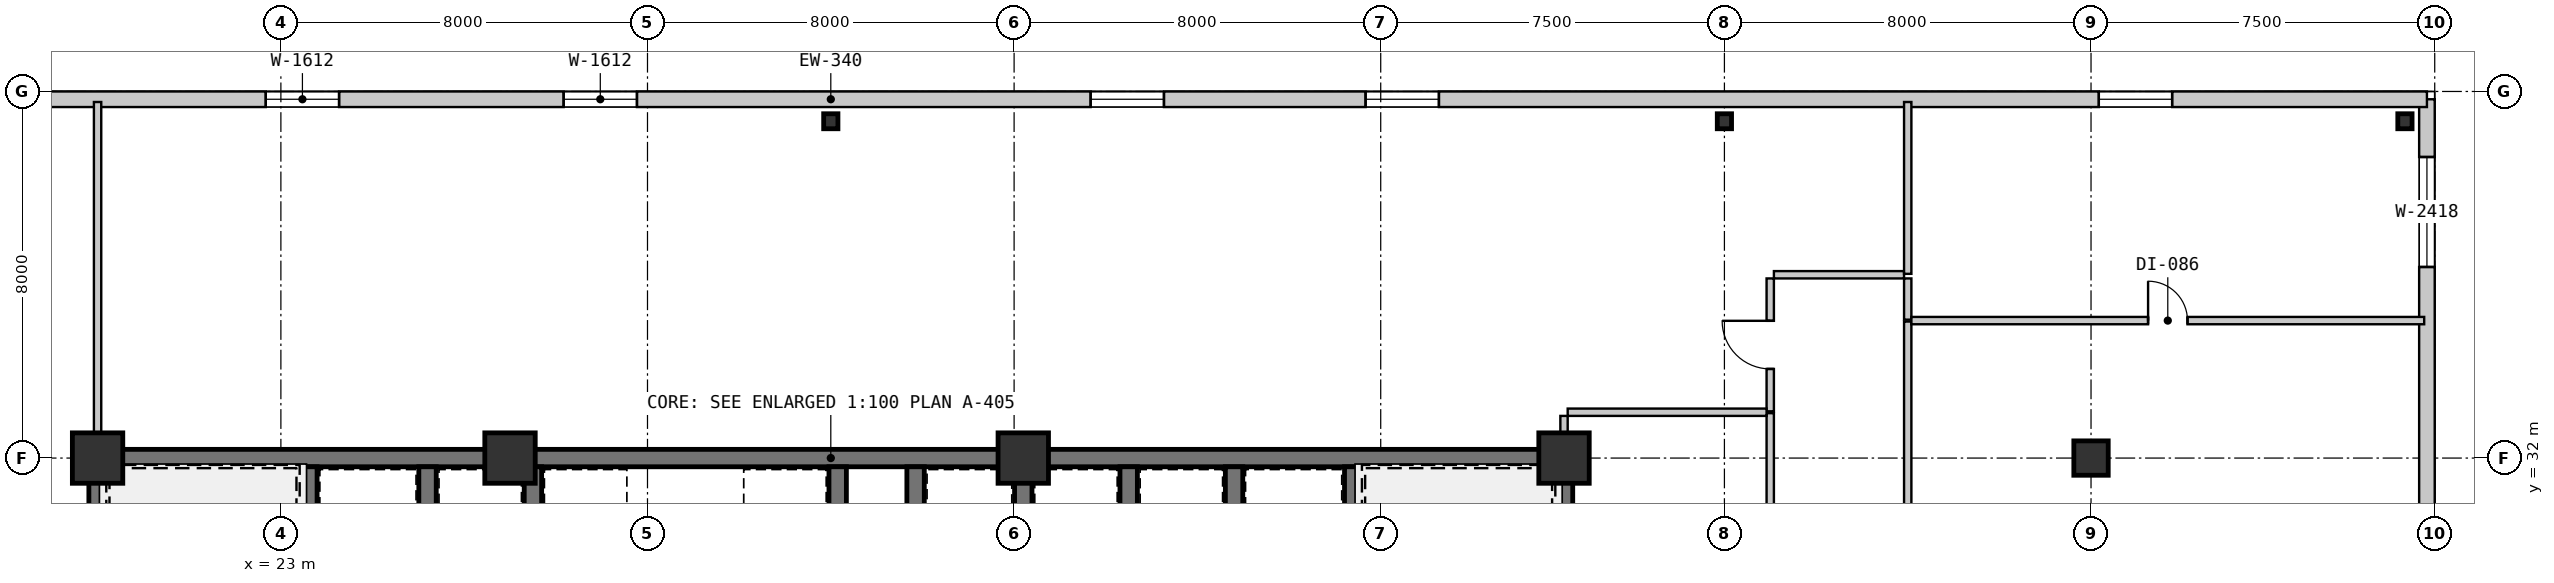
"""IFC4 building model, lengths in metres.
Left out: names, types, materials, properties, quantities, classifications, styles, units other than length and angle.
Written with IfcOpenShell. Run it as: python <this file> out.ifc"""

import sys

from ifc_helpers import new_model, si_unit, direction, frame, frame_2d, origin, origin_2d, place, context, subcontext, project, spatial, rectangle, circle, i_section, extrude, source, transform, mapped, element, fill, save


model = new_model("IFC4")
c1 = context("Model", 3, precision=1e-05, world=origin(), true_north=direction((0.0, 1.0)))
c2 = subcontext(c1, "Body", "Model", "MODEL_VIEW")
j1 = project(units=[si_unit("LENGTHUNIT", "METRE"), si_unit("PLANEANGLEUNIT", "RADIAN")], contexts=[c1])
p1 = place(None, origin())
s1 = spatial("IfcSite", under=j1, at=p1, CompositionType="ELEMENT")
p2 = place(p1, origin())
s2 = spatial("IfcBuilding", under=s1, at=p2, CompositionType="ELEMENT")
p3 = place(p2, frame((0.0, 0.0, 8.4)))
s3 = spatial("IfcBuildingStorey", under=s2, at=p3, CompositionType="ELEMENT", Elevation=8.4)
m1 = source(origin(), c2, "Body", "SweptSolid", [
    extrude(rectangle(XDim=1.1, YDim=1.1, at=origin_2d()), origin(), (0.0, 0.0, 1.0), 4.55),
])
for number, where, z_axis, x_axis in (
    (1, (19.0, 32.0, 0.0), (0.0, 0.0, 1.0), (1.0, 0.0, 0.0)),
    (2, (28.0, 32.0, 0.0), (0.0, 0.0, 1.0), (1.0, 0.0, 0.0)),
    (3, (39.2, 32.0, 0.0), (0.0, 0.0, 1.0), (1.0, 0.0, 0.0)),
    (4, (51.0, 32.0, 0.0), (0.0, 0.0, 1.0), (1.0, 0.0, 0.0)),
):
    element("IfcColumn", number, at=place(p3, frame(where, z_axis=z_axis, x_axis=x_axis)), inside=s3, PredefinedType="COLUMN", context=c2, shape_type="MappedRepresentation", body=[
        mapped(m1, transform((0.0, 0.0, 0.0), scale=1.0)),
    ])
m2 = source(origin(), c2, "Body", "SweptSolid", [
    extrude(circle(Radius=0.375, at=origin_2d()), origin(), (0.0, 0.0, 1.0), 4.55),
])
p4 = place(p3, frame((62.5, 32.0, 0.0), z_axis=(0.0, 0.0, 1.0), x_axis=(1.0, 0.0, 0.0)))
e5 = element("IfcColumn", 5, at=p4, inside=s3, PredefinedType="COLUMN", context=c2, shape_type="MappedRepresentation", body=[
    mapped(m2, transform((0.0, 0.0, 0.0), scale=1.0)),
])
m3 = source(origin(), c2, "Body", "SweptSolid", [
    extrude(i_section(OverallWidth=0.311, OverallDepth=0.327, WebThickness=0.016, FlangeThickness=0.025, at=origin_2d()), origin(), (0.0, 0.0, 1.0), 4.55),
])
for number, where, z_axis, x_axis in (
    (6, (69.35, 39.35, 0.0), (0.0, 0.0, 1.0), (1.0, 0.0, 0.0)),
    (7, (35.0, 39.35, 0.0), (0.0, 0.0, 1.0), (1.0, 0.0, 0.0)),
    (8, (54.5, 39.35, 0.0), (0.0, 0.0, 1.0), (1.0, 0.0, 0.0)),
):
    element("IfcColumn", number, at=place(p3, frame(where, z_axis=z_axis, x_axis=x_axis)), inside=s3, PredefinedType="COLUMN", context=c2, shape_type="MappedRepresentation", body=[
        mapped(m3, transform((0.0, 0.0, 0.0), scale=1.0)),
    ])
m4 = source(origin(), c2, "Body", "SweptSolid", [
    extrude(rectangle(XDim=39.66, YDim=0.34, at=frame_2d((19.83, 0.0))), origin(), (0.0, 0.0, 1.0), 4.29),
])
p5 = place(p3, frame((69.83, 0.17, 0.0), z_axis=(0.0, 0.0, 1.0), x_axis=(0.0, 1.0, 0.0)))
e9 = element("IfcWall", 9, at=p5, inside=s3, PredefinedType="SOLIDWALL", context=c2, shape_type="MappedRepresentation", body=[
    mapped(m4, transform((0.0, 0.0, 0.0), scale=1.0)),
])
m5 = source(origin(), c2, "Body", "SweptSolid", [
    extrude(rectangle(XDim=1.8, YDim=1.6, at=frame_2d((0.9, 0.8))), frame((0.0, 0.18, 0.0), z_axis=(0.0, -1.0, 0.0), x_axis=(1.0, 0.0, 0.0)), (0.0, 0.0, 1.0), 0.36),
])
p6 = place(p5, frame((3.2, 0.0, 0.95)))
e10 = element("IfcOpeningElement", 10, at=p6, cuts=e9, PredefinedType="OPENING", context=c2, shape_type="MappedRepresentation", body=[
    mapped(m5, transform((0.0, 0.0, 0.0), scale=1.0)),
])
m6 = source(origin(), c2, "Body", "SweptSolid", [
    extrude(rectangle(XDim=1.5, YDim=1.5, at=frame_2d((0.75, 0.75))), frame((0.0, 0.18, 0.0), z_axis=(0.0, -1.0, 0.0), x_axis=(1.0, 0.0, 0.0)), (0.0, 0.0, 1.0), 0.36),
])
p7 = place(p5, frame((7.8, 0.0, 0.95)))
e11 = element("IfcOpeningElement", 11, at=p7, cuts=e9, PredefinedType="OPENING", context=c2, shape_type="MappedRepresentation", body=[
    mapped(m6, transform((0.0, 0.0, 0.0), scale=1.0)),
])
m7 = source(origin(), c2, "Body", "SweptSolid", [
    extrude(rectangle(XDim=1.2, YDim=1.5, at=frame_2d((0.6, 0.75))), frame((0.0, 0.18, 0.0), z_axis=(0.0, -1.0, 0.0), x_axis=(1.0, 0.0, 0.0)), (0.0, 0.0, 1.0), 0.36),
])
p8 = place(p5, frame((21.2, 0.0, 0.95)))
e12 = element("IfcOpeningElement", 12, at=p8, cuts=e9, PredefinedType="OPENING", context=c2, shape_type="MappedRepresentation", body=[
    mapped(m7, transform((0.0, 0.0, 0.0), scale=1.0)),
])
m8 = source(origin(), c2, "Body", "SweptSolid", [
    extrude(rectangle(XDim=2.4, YDim=1.8, at=frame_2d((1.2, 0.9))), frame((0.0, 0.18, 0.0), z_axis=(0.0, -1.0, 0.0), x_axis=(1.0, 0.0, 0.0)), (0.0, 0.0, 1.0), 0.36),
])
p9 = place(p5, frame((36.0, 0.0, 0.95)))
e13 = element("IfcOpeningElement", 13, at=p9, cuts=e9, PredefinedType="OPENING", context=c2, shape_type="MappedRepresentation", body=[
    mapped(m8, transform((0.0, 0.0, 0.0), scale=1.0)),
])
m9 = source(origin(), c2, "Body", "SweptSolid", [
    extrude(rectangle(XDim=69.66, YDim=0.34, at=frame_2d((34.83, 0.0))), origin(), (0.0, 0.0, 1.0), 4.29),
])
p10 = place(p3, frame((0.17, 39.83, 0.0), z_axis=(0.0, 0.0, 1.0), x_axis=(1.0, 0.0, 0.0)))
e14 = element("IfcWall", 14, at=p10, inside=s3, PredefinedType="SOLIDWALL", context=c2, shape_type="MappedRepresentation", body=[
    mapped(m9, transform((0.0, 0.0, 0.0), scale=1.0)),
])
m10 = source(origin(), c2, "Body", "SweptSolid", [
    extrude(rectangle(XDim=1.6, YDim=1.2, at=frame_2d((0.8, 0.6))), frame((0.0, 0.18, 0.0), z_axis=(0.0, -1.0, 0.0), x_axis=(1.0, 0.0, 0.0)), (0.0, 0.0, 1.0), 0.36),
])
p11 = place(p10, frame((4.5, 0.0, 0.95)))
e15 = element("IfcOpeningElement", 15, at=p11, cuts=e14, PredefinedType="OPENING", context=c2, shape_type="MappedRepresentation", body=[
    mapped(m10, transform((0.0, 0.0, 0.0), scale=1.0)),
])
p12 = place(p10, frame((22.5, 0.0, 0.95)))
e16 = element("IfcOpeningElement", 16, at=p12, cuts=e14, PredefinedType="OPENING", context=c2, shape_type="MappedRepresentation", body=[
    mapped(m10, transform((0.0, 0.0, 0.0), scale=1.0)),
])
p13 = place(p10, frame((29.0, 0.0, 0.95)))
e17 = element("IfcOpeningElement", 17, at=p13, cuts=e14, PredefinedType="OPENING", context=c2, shape_type="MappedRepresentation", body=[
    mapped(m10, transform((0.0, 0.0, 0.0), scale=1.0)),
])
p14 = place(p10, frame((40.5, 0.0, 0.95)))
e18 = element("IfcOpeningElement", 18, at=p14, cuts=e14, PredefinedType="OPENING", context=c2, shape_type="MappedRepresentation", body=[
    mapped(m10, transform((0.0, 0.0, 0.0), scale=1.0)),
])
p15 = place(p10, frame((46.5, 0.0, 0.95)))
e19 = element("IfcOpeningElement", 19, at=p15, cuts=e14, PredefinedType="OPENING", context=c2, shape_type="MappedRepresentation", body=[
    mapped(m10, transform((0.0, 0.0, 0.0), scale=1.0)),
])
p16 = place(p10, frame((62.5, 0.0, 0.95)))
e20 = element("IfcOpeningElement", 20, at=p16, cuts=e14, PredefinedType="OPENING", context=c2, shape_type="MappedRepresentation", body=[
    mapped(m10, transform((0.0, 0.0, 0.0), scale=1.0)),
])
m11 = source(origin(), c2, "Body", "SweptSolid", [
    extrude(rectangle(XDim=9.19, YDim=0.38, at=frame_2d((4.595, 0.0))), origin(), (0.0, 0.0, 1.0), 4.29),
])
p17 = place(p3, frame((18.81, 32.0, 0.0), z_axis=(0.0, 0.0, 1.0), x_axis=(1.0, 0.0, 0.0)))
e21 = element("IfcWall", 21, at=p17, inside=s3, PredefinedType="SHEAR", context=c2, shape_type="MappedRepresentation", body=[
    mapped(m11, transform((0.0, 0.0, 0.0), scale=1.0)),
])
m12 = source(origin(), c2, "Body", "SweptSolid", [
    extrude(rectangle(XDim=11.2, YDim=0.38, at=frame_2d((5.6, 0.0))), origin(), (0.0, 0.0, 1.0), 4.29),
])
p18 = place(p3, frame((28.0, 32.0, 0.0), z_axis=(0.0, 0.0, 1.0), x_axis=(1.0, 0.0, 0.0)))
e22 = element("IfcWall", 22, at=p18, inside=s3, PredefinedType="SHEAR", context=c2, shape_type="MappedRepresentation", body=[
    mapped(m12, transform((0.0, 0.0, 0.0), scale=1.0)),
])
m13 = source(origin(), c2, "Body", "SweptSolid", [
    extrude(rectangle(XDim=11.99, YDim=0.38, at=frame_2d((5.995, 0.0))), origin(), (0.0, 0.0, 1.0), 4.29),
])
p19 = place(p3, frame((39.2, 32.0, 0.0), z_axis=(0.0, 0.0, 1.0), x_axis=(1.0, 0.0, 0.0)))
e23 = element("IfcWall", 23, at=p19, inside=s3, PredefinedType="SHEAR", context=c2, shape_type="MappedRepresentation", body=[
    mapped(m13, transform((0.0, 0.0, 0.0), scale=1.0)),
])
m14 = source(origin(), c2, "Body", "SweptSolid", [
    extrude(rectangle(XDim=3.61, YDim=0.38, at=frame_2d((1.805, 0.0))), origin(), (0.0, 0.0, 1.0), 4.29),
])
for number, where, z_axis, x_axis in (
    (24, (19.0, 28.2, 0.0), (0.0, 0.0, 1.0), (0.0, 1.0, 0.0)),
    (25, (51.0, 28.2, 0.0), (0.0, 0.0, 1.0), (0.0, 1.0, 0.0)),
):
    element("IfcWall", number, at=place(p3, frame(where, z_axis=z_axis, x_axis=x_axis)), inside=s3, PredefinedType="SHEAR", context=c2, shape_type="MappedRepresentation", body=[
        mapped(m14, transform((0.0, 0.0, 0.0), scale=1.0)),
    ])
m15 = source(origin(), c2, "Body", "SweptSolid", [
    extrude(rectangle(XDim=3.42, YDim=0.38, at=frame_2d((1.71, 0.0))), origin(), (0.0, 0.0, 1.0), 4.29),
])
for number, where, z_axis, x_axis in (
    (26, (23.6, 28.39, 0.0), (0.0, 0.0, 1.0), (0.0, 1.0, 0.0)),
    (27, (26.2, 28.39, 0.0), (0.0, 0.0, 1.0), (0.0, 1.0, 0.0)),
    (28, (46.4, 31.81, 0.0), (0.0, 0.0, 1.0), (0.0, -1.0, 0.0)),
    (29, (43.8, 31.81, 0.0), (0.0, 0.0, 1.0), (0.0, -1.0, 0.0)),
):
    element("IfcWall", number, at=place(p3, frame(where, z_axis=z_axis, x_axis=x_axis)), inside=s3, PredefinedType="SHEAR", context=c2, shape_type="MappedRepresentation", body=[
        mapped(m15, transform((0.0, 0.0, 0.0), scale=1.0)),
    ])
m16 = source(origin(), c2, "Body", "SweptSolid", [
    extrude(rectangle(XDim=1.12, YDim=0.38, at=frame_2d((0.56, 0.0))), origin(), (0.0, 0.0, 1.0), 4.29),
])
for number, where, z_axis, x_axis in (
    (30, (35.15, 31.81, 0.0), (0.0, 0.0, 1.0), (0.0, -1.0, 0.0)),
    (31, (36.85, 30.69, 0.0), (0.0, 0.0, 1.0), (0.0, 1.0, 0.0)),
):
    element("IfcWall", number, at=place(p3, frame(where, z_axis=z_axis, x_axis=x_axis)), inside=s3, PredefinedType="SHEAR", context=c2, shape_type="MappedRepresentation", body=[
        mapped(m16, transform((0.0, 0.0, 0.0), scale=1.0)),
    ])
for number, where, z_axis, x_axis in (
    (32, (28.5, 28.39, 0.0), (0.0, 0.0, 1.0), (0.0, 1.0, 0.0)),
    (33, (39.2, 28.39, 0.0), (0.0, 0.0, 1.0), (0.0, 1.0, 0.0)),
    (34, (41.5, 28.39, 0.0), (0.0, 0.0, 1.0), (0.0, 1.0, 0.0)),
):
    element("IfcWall", number, at=place(p3, frame(where, z_axis=z_axis, x_axis=x_axis)), inside=s3, PredefinedType="SHEAR", context=c2, shape_type="MappedRepresentation", body=[
        mapped(m15, transform((0.0, 0.0, 0.0), scale=1.0)),
    ])
m17 = source(origin(), c2, "Body", "SweptSolid", [
    extrude(rectangle(XDim=9.959, YDim=0.16, at=frame_2d((4.98, 0.0))), origin(), (0.0, 0.0, 1.0), 4.29),
])
p20 = place(p3, frame((58.5, 34.98, 0.0), z_axis=(0.0, 0.0, 1.0), x_axis=(0.0, -1.0, 0.0)))
e35 = element("IfcWall", 35, at=p20, inside=s3, PredefinedType="PARTITIONING", context=c2, shape_type="MappedRepresentation", body=[
    mapped(m17, transform((0.0, 0.0, 0.0), scale=1.0)),
])
m18 = source(origin(), c2, "Body", "SweptSolid", [
    extrude(rectangle(XDim=1.05, YDim=2.1, at=frame_2d((0.525, 1.05))), frame((0.0, 0.09, 0.0), z_axis=(0.0, -1.0, 0.0), x_axis=(1.0, 0.0, 0.0)), (0.0, 0.0, 1.0), 0.18),
])
p21 = place(p20, frame((4.455, 0.0, 0.0)))
e36 = element("IfcOpeningElement", 36, at=p21, cuts=e35, PredefinedType="OPENING", context=c2, shape_type="MappedRepresentation", body=[
    mapped(m18, transform((0.0, 0.0, 0.0), scale=1.0)),
])
m19 = source(origin(), c2, "Body", "SweptSolid", [
    extrude(rectangle(XDim=0.9, YDim=0.16, at=frame_2d((0.45, 0.0))), origin(), (0.0, 0.0, 1.0), 4.29),
])
p22 = place(p3, frame((58.5, 35.92, 0.0), z_axis=(0.0, 0.0, 1.0), x_axis=(0.0, -1.0, 0.0)))
e37 = element("IfcWall", 37, at=p22, inside=s3, PredefinedType="PARTITIONING", context=c2, shape_type="MappedRepresentation", body=[
    mapped(m19, transform((0.0, 0.0, 0.0), scale=1.0)),
])
m20 = source(origin(), c2, "Body", "SweptSolid", [
    extrude(rectangle(XDim=8.9, YDim=0.16, at=frame_2d((4.45, 0.0))), origin(), (0.0, 0.0, 1.0), 4.29),
])
p23 = place(p3, frame((55.5, 24.08, 0.0), z_axis=(0.0, 0.0, 1.0), x_axis=(0.0, 1.0, 0.0)))
e38 = element("IfcWall", 38, at=p23, inside=s3, PredefinedType="PARTITIONING", context=c2, shape_type="MappedRepresentation", body=[
    mapped(m20, transform((0.0, 0.0, 0.0), scale=1.0)),
])
p24 = place(p23, frame((3.895, 0.0, 0.0)))
e39 = element("IfcOpeningElement", 39, at=p24, cuts=e38, PredefinedType="OPENING", context=c2, shape_type="MappedRepresentation", body=[
    mapped(m18, transform((0.0, 0.0, 0.0), scale=1.0)),
])
m21 = source(origin(), c2, "Body", "SweptSolid", [
    extrude(rectangle(XDim=2.9, YDim=0.16, at=frame_2d((1.45, 0.0))), origin(), (0.0, 0.0, 1.0), 4.29),
])
p25 = place(p3, frame((55.5, 33.02, 0.0), z_axis=(0.0, 0.0, 1.0), x_axis=(0.0, 1.0, 0.0)))
e40 = element("IfcWall", 40, at=p25, inside=s3, PredefinedType="PARTITIONING", context=c2, shape_type="MappedRepresentation", body=[
    mapped(m21, transform((0.0, 0.0, 0.0), scale=1.0)),
])
p26 = place(p25, frame((0.925, 0.0, 0.0)))
e41 = element("IfcOpeningElement", 41, at=p26, cuts=e40, PredefinedType="OPENING", context=c2, shape_type="MappedRepresentation", body=[
    mapped(m18, transform((0.0, 0.0, 0.0), scale=1.0)),
])
m22 = source(origin(), c2, "Body", "SweptSolid", [
    extrude(rectangle(XDim=2.84, YDim=0.16, at=frame_2d((1.42, 0.0))), origin(), (0.0, 0.0, 1.0), 4.29),
])
p27 = place(p3, frame((55.58, 36.0, 0.0), z_axis=(0.0, 0.0, 1.0), x_axis=(1.0, 0.0, 0.0)))
e42 = element("IfcWall", 42, at=p27, inside=s3, PredefinedType="PARTITIONING", context=c2, shape_type="MappedRepresentation", body=[
    mapped(m22, transform((0.0, 0.0, 0.0), scale=1.0)),
])
m23 = source(origin(), c2, "Body", "SweptSolid", [
    extrude(rectangle(XDim=7.58, YDim=0.16, at=frame_2d((3.79, 0.0))), origin(), (0.0, 0.0, 1.0), 4.29),
])
p28 = place(p3, frame((19.0, 39.77, 0.0), z_axis=(0.0, 0.0, 1.0), x_axis=(0.0, -1.0, 0.0)))
e43 = element("IfcWall", 43, at=p28, inside=s3, PredefinedType="PARTITIONING", context=c2, shape_type="MappedRepresentation", body=[
    mapped(m23, transform((0.0, 0.0, 0.0), scale=1.0)),
])
m24 = source(origin(), c2, "Body", "SweptSolid", [
    extrude(rectangle(XDim=11.19, YDim=0.16, at=frame_2d((5.595, 0.0))), origin(), (0.0, 0.0, 1.0), 4.29),
])
p29 = place(p3, frame((58.58, 35.0, 0.0), z_axis=(0.0, 0.0, 1.0), x_axis=(1.0, 0.0, 0.0)))
e44 = element("IfcWall", 44, at=p29, inside=s3, PredefinedType="PARTITIONING", context=c2, shape_type="MappedRepresentation", body=[
    mapped(m24, transform((0.0, 0.0, 0.0), scale=1.0)),
])
m25 = source(origin(), c2, "Body", "SweptSolid", [
    extrude(rectangle(XDim=0.86, YDim=2.1, at=frame_2d((0.43, 1.05))), frame((0.0, 0.09, 0.0), z_axis=(0.0, -1.0, 0.0), x_axis=(1.0, 0.0, 0.0)), (0.0, 0.0, 1.0), 0.18),
])
p30 = place(p29, frame((5.165, 0.0, 0.0)))
e45 = element("IfcOpeningElement", 45, at=p30, cuts=e44, PredefinedType="OPENING", context=c2, shape_type="MappedRepresentation", body=[
    mapped(m25, transform((0.0, 0.0, 0.0), scale=1.0)),
])
m26 = source(origin(), c2, "Body", "SweptSolid", [
    extrude(rectangle(XDim=3.75, YDim=0.16, at=frame_2d((1.875, 0.0))), origin(), (0.0, 0.0, 1.0), 4.29),
])
p31 = place(p3, frame((58.5, 36.02, 0.0), z_axis=(0.0, 0.0, 1.0), x_axis=(0.0, 1.0, 0.0)))
e46 = element("IfcWall", 46, at=p31, inside=s3, PredefinedType="PARTITIONING", context=c2, shape_type="MappedRepresentation", body=[
    mapped(m26, transform((0.0, 0.0, 0.0), scale=1.0)),
])
m27 = source(origin(), c2, "Body", "SweptSolid", [
    extrude(rectangle(XDim=4.34, YDim=0.16, at=frame_2d((2.17, 0.0))), origin(), (0.0, 0.0, 1.0), 4.29),
])
p32 = place(p3, frame((51.08, 33.0, 0.0), z_axis=(0.0, 0.0, 1.0), x_axis=(1.0, 0.0, 0.0)))
e47 = element("IfcWall", 47, at=p32, inside=s3, PredefinedType="PARTITIONING", context=c2, shape_type="MappedRepresentation", body=[
    mapped(m27, transform((0.0, 0.0, 0.0), scale=1.0)),
])
m28 = source(origin(), c2, "Body", "SweptSolid", [
    extrude(rectangle(XDim=0.73, YDim=0.16, at=frame_2d((0.365, 0.0))), origin(), (0.0, 0.0, 1.0), 4.29),
])
p33 = place(p3, frame((51.0, 32.19, 0.0), z_axis=(0.0, 0.0, 1.0), x_axis=(0.0, 1.0, 0.0)))
e48 = element("IfcWall", 48, at=p33, inside=s3, PredefinedType="PARTITIONING", context=c2, shape_type="MappedRepresentation", body=[
    mapped(m28, transform((0.0, 0.0, 0.0), scale=1.0)),
])
m29 = source(origin(), c2, "Body", "SweptSolid", [
    extrude(rectangle(XDim=2.4, YDim=1.8, at=frame_2d((1.2, 0.9))), frame((0.0, 0.03, 0.0), z_axis=(0.0, -1.0, 0.0), x_axis=(1.0, 0.0, 0.0)), (0.0, 0.0, 1.0), 0.06),
])
p34 = place(p9, origin())
e49 = element("IfcWindow", 49, at=p34, inside=s3, PartitioningType="SINGLE_PANEL", PredefinedType="WINDOW", context=c2, shape_type="MappedRepresentation", body=[
    mapped(m29, transform((0.0, 0.0, 0.0), scale=1.0)),
])
fill(e13, e49)
m30 = source(origin(), c2, "Body", "SweptSolid", [
    extrude(rectangle(XDim=1.6, YDim=1.2, at=frame_2d((0.8, 0.6))), frame((0.0, 0.03, 0.0), z_axis=(0.0, -1.0, 0.0), x_axis=(1.0, 0.0, 0.0)), (0.0, 0.0, 1.0), 0.06),
])
p35 = place(p12, origin())
e50 = element("IfcWindow", 50, at=p35, inside=s3, PartitioningType="SINGLE_PANEL", PredefinedType="WINDOW", context=c2, shape_type="MappedRepresentation", body=[
    mapped(m30, transform((0.0, 0.0, 0.0), scale=1.0)),
])
fill(e16, e50)
p36 = place(p13, origin())
e51 = element("IfcWindow", 51, at=p36, inside=s3, PartitioningType="SINGLE_PANEL", PredefinedType="WINDOW", context=c2, shape_type="MappedRepresentation", body=[
    mapped(m30, transform((0.0, 0.0, 0.0), scale=1.0)),
])
fill(e17, e51)
p37 = place(p14, origin())
e52 = element("IfcWindow", 52, at=p37, inside=s3, PartitioningType="SINGLE_PANEL", PredefinedType="WINDOW", context=c2, shape_type="MappedRepresentation", body=[
    mapped(m30, transform((0.0, 0.0, 0.0), scale=1.0)),
])
fill(e18, e52)
p38 = place(p15, origin())
e53 = element("IfcWindow", 53, at=p38, inside=s3, PartitioningType="SINGLE_PANEL", PredefinedType="WINDOW", context=c2, shape_type="MappedRepresentation", body=[
    mapped(m30, transform((0.0, 0.0, 0.0), scale=1.0)),
])
fill(e19, e53)
p39 = place(p16, origin())
e54 = element("IfcWindow", 54, at=p39, inside=s3, PartitioningType="SINGLE_PANEL", PredefinedType="WINDOW", context=c2, shape_type="MappedRepresentation", body=[
    mapped(m30, transform((0.0, 0.0, 0.0), scale=1.0)),
])
fill(e20, e54)
m31 = source(origin(), c2, "Body", "SweptSolid", [
    extrude(rectangle(XDim=1.05, YDim=2.1, at=frame_2d((0.525, 1.05))), frame((0.0, 0.025, 0.0), z_axis=(0.0, -1.0, 0.0), x_axis=(1.0, 0.0, 0.0)), (0.0, 0.0, 1.0), 0.05),
])
p40 = place(p26, origin())
e55 = element("IfcDoor", 55, at=p40, inside=s3, OperationType="SINGLE_SWING_RIGHT", PredefinedType="DOOR", context=c2, shape_type="MappedRepresentation", body=[
    mapped(m31, transform((0.0, 0.0, 0.0), scale=1.0)),
])
fill(e41, e55)
m32 = source(origin(), c2, "Body", "SweptSolid", [
    extrude(rectangle(XDim=0.86, YDim=2.1, at=frame_2d((0.43, 1.05))), frame((0.0, 0.025, 0.0), z_axis=(0.0, -1.0, 0.0), x_axis=(1.0, 0.0, 0.0)), (0.0, 0.0, 1.0), 0.05),
])
p41 = place(p30, origin())
e56 = element("IfcDoor", 56, at=p41, inside=s3, OperationType="SINGLE_SWING_LEFT", PredefinedType="DOOR", context=c2, shape_type="MappedRepresentation", body=[
    mapped(m32, transform((0.0, 0.0, 0.0), scale=1.0)),
])
fill(e45, e56)
save(model, sys.argv[1])
